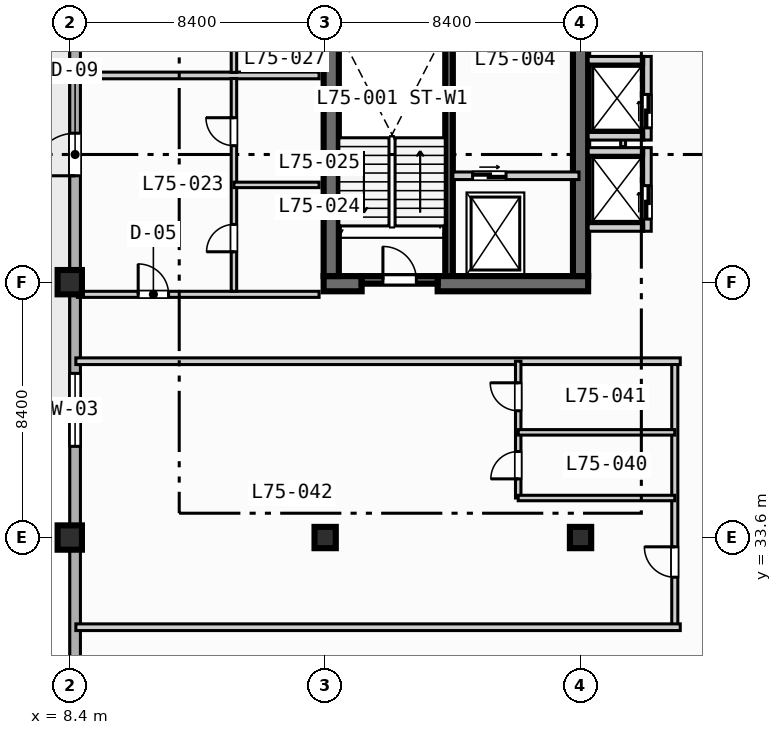
"""IFC4 building model, lengths in metres.
Left out: names, types, materials, properties, quantities, classifications, styles, units other than length and angle.
Written with IfcOpenShell. Run it as: python <this file> out.ifc"""

import sys

from ifc_helpers import new_model, si_unit, direction, frame, frame_2d, origin, origin_2d, place, context, subcontext, project, spatial, rectangle, extrude, element, fill, save


model = new_model("IFC4")
c1 = context("Model", 3, precision=1e-05, world=origin(), true_north=direction((0.0, 1.0)))
c2 = subcontext(c1, "Body", "Model", "MODEL_VIEW")
j1 = project(units=[si_unit("LENGTHUNIT", "METRE"), si_unit("PLANEANGLEUNIT", "RADIAN")], contexts=[c1])
p1 = place(None, origin())
s1 = spatial("IfcSite", under=j1, at=p1, CompositionType="ELEMENT")
p2 = place(p1, origin())
s2 = spatial("IfcBuilding", under=s1, at=p2, CompositionType="ELEMENT")
p3 = place(p2, frame((0.0, 0.0, 304.7)))
s3 = spatial("IfcBuildingStorey", under=s2, at=p3, CompositionType="ELEMENT", Elevation=304.7)
p4 = place(p3, frame((20.875, 42.2, 0.0), z_axis=(0.0, 0.0, 1.0), x_axis=(0.0, 1.0, 0.0)))
e1 = element("IfcWall", 1, at=p4, inside=s3, PredefinedType="SOLIDWALL", context=c2, shape_type="SweptSolid", body=[
    extrude(rectangle(XDim=8.05, YDim=0.25, at=frame_2d((4.025, 0.0))), origin(), (0.0, 0.0, 1.0), 3.67),
])
p5 = place(p3, frame((16.75, 41.95, 0.0), z_axis=(0.0, 0.0, 1.0), x_axis=(1.0, 0.0, 0.0)))
e2 = element("IfcWall", 2, at=p5, inside=s3, PredefinedType="SHEAR", context=c2, shape_type="SweptSolid", body=[
    extrude(rectangle(XDim=1.25, YDim=0.5, at=frame_2d((0.625, 0.0))), origin(), (0.0, 0.0, 1.0), 3.67),
])
p6 = place(p3, frame((20.5, 41.95, 0.0), z_axis=(0.0, 0.0, 1.0), x_axis=(1.0, 0.0, 0.0)))
e3 = element("IfcWall", 3, at=p6, inside=s3, PredefinedType="SHEAR", context=c2, shape_type="SweptSolid", body=[
    extrude(rectangle(XDim=4.95, YDim=0.5, at=frame_2d((2.475, 0.0))), origin(), (0.0, 0.0, 1.0), 3.67),
])
p7 = place(p3, frame((17.0, 42.2, 0.0), z_axis=(0.0, 0.0, 1.0), x_axis=(0.0, 1.0, 0.0)))
e4 = element("IfcWall", 4, at=p7, inside=s3, PredefinedType="SHEAR", context=c2, shape_type="SweptSolid", body=[
    extrude(rectangle(XDim=16.35, YDim=0.5, at=frame_2d((8.175, 0.0))), origin(), (0.0, 0.0, 1.0), 3.67),
])
p8 = place(p3, frame((25.2, 42.2, 0.0), z_axis=(0.0, 0.0, 1.0), x_axis=(0.0, 1.0, 0.0)))
e5 = element("IfcWall", 5, at=p8, inside=s3, PredefinedType="SHEAR", context=c2, shape_type="SweptSolid", body=[
    extrude(rectangle(XDim=8.6, YDim=0.5, at=frame_2d((4.3, 0.0))), origin(), (0.0, 0.0, 1.0), 3.67),
])
for number, where, z_axis, x_axis in (
    (6, (8.4, 33.6, 0.0), (0.0, 0.0, 1.0), (1.0, 0.0, 0.0)),
    (7, (8.4, 42.0, 0.0), (0.0, 0.0, 1.0), (1.0, 0.0, 0.0)),
):
    element("IfcColumn", number, at=place(p3, frame(where, z_axis=z_axis, x_axis=x_axis)), inside=s3, PredefinedType="COLUMN", context=c2, shape_type="SweptSolid", body=[
        extrude(rectangle(XDim=0.8, YDim=0.8, at=origin_2d()), origin(), (0.0, 0.0, 1.0), 3.9),
    ])
for number, where, z_axis, x_axis in (
    (8, (16.8, 33.6, 0.0), (0.0, 0.0, 1.0), (1.0, 0.0, 0.0)),
    (9, (25.2, 33.6, 0.0), (0.0, 0.0, 1.0), (1.0, 0.0, 0.0)),
):
    element("IfcColumn", number, at=place(p3, frame(where, z_axis=z_axis, x_axis=x_axis)), inside=s3, PredefinedType="COLUMN", context=c2, shape_type="SweptSolid", body=[
        extrude(rectangle(XDim=0.7, YDim=0.7, at=origin_2d()), origin(), (0.0, 0.0, 1.0), 3.9),
    ])
p9 = place(p3, frame((8.575, 11.575, 0.0), z_axis=(0.0, 0.0, 1.0), x_axis=(0.0, 1.0, 0.0)))
e10 = element("IfcWall", 10, at=p9, inside=s3, PredefinedType="STANDARD", context=c2, shape_type="SweptSolid", body=[
    extrude(rectangle(XDim=60.85, YDim=0.35, at=frame_2d((30.425, 0.0))), origin(), (0.0, 0.0, 1.0), 3.67),
])
p10 = place(p9, frame((33.925, 0.0, 0.0)))
e11 = element("IfcOpeningElement", 11, at=p10, cuts=e10, PredefinedType="OPENING", context=c2, shape_type="SweptSolid", body=[
    extrude(rectangle(XDim=1.4, YDim=2.2, at=frame_2d((0.7, 1.1))), frame((0.0, 0.185, 0.0), z_axis=(0.0, -1.0, 0.0), x_axis=(1.0, 0.0, 0.0)), (0.0, 0.0, 1.0), 0.37),
])
p11 = place(p9, frame((25.025, 0.0, 0.85)))
e12 = element("IfcOpeningElement", 12, at=p11, cuts=e10, PredefinedType="OPENING", context=c2, shape_type="SweptSolid", body=[
    extrude(rectangle(XDim=2.4, YDim=1.95, at=frame_2d((1.2, 0.975))), frame((0.0, 0.185, 0.0), z_axis=(0.0, -1.0, 0.0), x_axis=(1.0, 0.0, 0.0)), (0.0, 0.0, 1.0), 0.37),
])
p12 = place(p9, frame((41.825, 0.0, 0.85)))
e13 = element("IfcOpeningElement", 13, at=p12, cuts=e10, PredefinedType="OPENING", context=c2, shape_type="SweptSolid", body=[
    extrude(rectangle(XDim=2.4, YDim=1.95, at=frame_2d((1.2, 0.975))), frame((0.0, 0.185, 0.0), z_axis=(0.0, -1.0, 0.0), x_axis=(1.0, 0.0, 0.0)), (0.0, 0.0, 1.0), 0.37),
])
p13 = place(p3, frame((18.0, 42.075, 0.0), z_axis=(0.0, 0.0, 1.0), x_axis=(1.0, 0.0, 0.0)))
e14 = element("IfcWall", 14, at=p13, inside=s3, PredefinedType="SOLIDWALL", context=c2, shape_type="SweptSolid", body=[
    extrude(rectangle(XDim=2.5, YDim=0.25, at=frame_2d((1.25, 0.0))), origin(), (0.0, 0.0, 1.0), 3.67),
])
p14 = place(p13, frame((0.7, 0.0, 0.0)))
e15 = element("IfcOpeningElement", 15, at=p14, cuts=e14, PredefinedType="OPENING", context=c2, shape_type="SweptSolid", body=[
    extrude(rectangle(XDim=1.1, YDim=2.15, at=frame_2d((0.55, 1.075))), frame((0.0, 0.135, 0.0), z_axis=(0.0, -1.0, 0.0), x_axis=(1.0, 0.0, 0.0)), (0.0, 0.0, 1.0), 0.27),
])
p15 = place(p3, frame((21.0, 45.5, 0.0), z_axis=(0.0, 0.0, 1.0), x_axis=(1.0, 0.0, 0.0)))
e16 = element("IfcWall", 16, at=p15, inside=s3, PredefinedType="SOLIDWALL", context=c2, shape_type="SweptSolid", body=[
    extrude(rectangle(XDim=4.15, YDim=0.25, at=frame_2d((2.075, 0.0))), origin(), (0.0, 0.0, 1.0), 3.67),
])
p16 = place(p15, frame((0.65, 0.0, 0.0)))
e17 = element("IfcOpeningElement", 17, at=p16, cuts=e16, PredefinedType="OPENING", context=c2, shape_type="SweptSolid", body=[
    extrude(rectangle(XDim=1.1, YDim=2.15, at=frame_2d((0.55, 1.075))), frame((0.0, 0.135, 0.0), z_axis=(0.0, -1.0, 0.0), x_axis=(1.0, 0.0, 0.0)), (0.0, 0.0, 1.0), 0.27),
])
p17 = place(p3, frame((27.4, 43.675, 0.0), z_axis=(0.0, 0.0, 1.0), x_axis=(0.0, 1.0, 0.0)))
e18 = element("IfcWall", 18, at=p17, inside=s3, PredefinedType="SOLIDWALL", context=c2, shape_type="SweptSolid", body=[
    extrude(rectangle(XDim=2.75, YDim=0.25, at=frame_2d((1.375, 0.0))), origin(), (0.0, 0.0, 1.0), 3.67),
])
p18 = place(p17, frame((0.4, 0.0, 0.0)))
e19 = element("IfcOpeningElement", 19, at=p18, cuts=e18, PredefinedType="OPENING", context=c2, shape_type="SweptSolid", body=[
    extrude(rectangle(XDim=1.1, YDim=2.15, at=frame_2d((0.55, 1.075))), frame((0.0, 0.135, 0.0), z_axis=(0.0, -1.0, 0.0), x_axis=(1.0, 0.0, 0.0)), (0.0, 0.0, 1.0), 0.27),
])
for number, where, z_axis, x_axis in (
    (20, (25.45, 43.8, 0.0), (0.0, 0.0, 1.0), (1.0, 0.0, 0.0)),
    (21, (25.45, 46.3, 0.0), (0.0, 0.0, 1.0), (1.0, 0.0, 0.0)),
):
    element("IfcWall", number, at=place(p3, frame(where, z_axis=z_axis, x_axis=x_axis)), inside=s3, PredefinedType="SOLIDWALL", context=c2, shape_type="SweptSolid", body=[
        extrude(rectangle(XDim=1.825, YDim=0.25, at=frame_2d((0.913, 0.0))), origin(), (0.0, 0.0, 1.0), 3.67),
    ])
p19 = place(p3, frame((26.6, 46.46, 0.0), z_axis=(0.0, 0.0, 1.0), x_axis=(0.0, 1.0, 0.0)))
e22 = element("IfcWall", 22, at=p19, inside=s3, PredefinedType="PARTITIONING", context=c2, shape_type="SweptSolid", body=[
    extrude(rectangle(XDim=0.88, YDim=0.16, at=frame_2d((0.44, 0.0))), origin(), (0.0, 0.0, 1.0), 3.67),
])
p20 = place(p3, frame((27.4, 46.675, 0.0), z_axis=(0.0, 0.0, 1.0), x_axis=(0.0, 1.0, 0.0)))
e23 = element("IfcWall", 23, at=p20, inside=s3, PredefinedType="SOLIDWALL", context=c2, shape_type="SweptSolid", body=[
    extrude(rectangle(XDim=2.75, YDim=0.25, at=frame_2d((1.375, 0.0))), origin(), (0.0, 0.0, 1.0), 3.67),
])
p21 = place(p20, frame((0.4, 0.0, 0.0)))
e24 = element("IfcOpeningElement", 24, at=p21, cuts=e23, PredefinedType="OPENING", context=c2, shape_type="SweptSolid", body=[
    extrude(rectangle(XDim=1.1, YDim=2.15, at=frame_2d((0.55, 1.075))), frame((0.0, 0.135, 0.0), z_axis=(0.0, -1.0, 0.0), x_axis=(1.0, 0.0, 0.0)), (0.0, 0.0, 1.0), 0.27),
])
for number, where, z_axis, x_axis in (
    (25, (25.45, 46.8, 0.0), (0.0, 0.0, 1.0), (1.0, 0.0, 0.0)),
    (26, (25.45, 49.3, 0.0), (0.0, 0.0, 1.0), (1.0, 0.0, 0.0)),
):
    element("IfcWall", number, at=place(p3, frame(where, z_axis=z_axis, x_axis=x_axis)), inside=s3, PredefinedType="SOLIDWALL", context=c2, shape_type="SweptSolid", body=[
        extrude(rectangle(XDim=1.825, YDim=0.25, at=frame_2d((0.913, 0.0))), origin(), (0.0, 0.0, 1.0), 3.67),
    ])
p22 = place(p3, frame((8.65, 41.6, 0.0), z_axis=(0.0, 0.0, 1.0), x_axis=(1.0, 0.0, 0.0)))
e27 = element("IfcWall", 27, at=p22, inside=s3, PredefinedType="PARTITIONING", context=c2, shape_type="SweptSolid", body=[
    extrude(rectangle(XDim=7.95, YDim=0.2, at=frame_2d((3.975, 0.0))), origin(), (0.0, 0.0, 1.0), 3.67),
])
p23 = place(p22, frame((2.0, 0.0, 0.0)))
e28 = element("IfcOpeningElement", 28, at=p23, cuts=e27, PredefinedType="OPENING", context=c2, shape_type="SweptSolid", body=[
    extrude(rectangle(XDim=1.0, YDim=2.15, at=frame_2d((0.5, 1.075))), frame((0.0, 0.11, 0.0), z_axis=(0.0, -1.0, 0.0), x_axis=(1.0, 0.0, 0.0)), (0.0, 0.0, 1.0), 0.22),
])
p24 = place(p3, frame((8.65, 48.8, 0.0), z_axis=(0.0, 0.0, 1.0), x_axis=(1.0, 0.0, 0.0)))
e29 = element("IfcWall", 29, at=p24, inside=s3, PredefinedType="PARTITIONING", context=c2, shape_type="SweptSolid", body=[
    extrude(rectangle(XDim=7.95, YDim=0.22, at=frame_2d((3.975, 0.0))), origin(), (0.0, 0.0, 1.0), 3.67),
])
p25 = place(p3, frame((13.8, 41.7, 0.0), z_axis=(0.0, 0.0, 1.0), x_axis=(0.0, 1.0, 0.0)))
e30 = element("IfcWall", 30, at=p25, inside=s3, PredefinedType="PLUMBINGWALL", context=c2, shape_type="SweptSolid", body=[
    extrude(rectangle(XDim=7.0, YDim=0.18, at=frame_2d((3.5, 0.0))), origin(), (0.0, 0.0, 1.0), 3.67),
])
p26 = place(p25, frame((1.3, 0.0, 0.0)))
e31 = element("IfcOpeningElement", 31, at=p26, cuts=e30, PredefinedType="OPENING", context=c2, shape_type="SweptSolid", body=[
    extrude(rectangle(XDim=0.9, YDim=2.1, at=frame_2d((0.45, 1.05))), frame((0.0, 0.1, 0.0), z_axis=(0.0, -1.0, 0.0), x_axis=(1.0, 0.0, 0.0)), (0.0, 0.0, 1.0), 0.2),
])
p27 = place(p25, frame((4.79, 0.0, 0.0)))
e32 = element("IfcOpeningElement", 32, at=p27, cuts=e30, PredefinedType="OPENING", context=c2, shape_type="SweptSolid", body=[
    extrude(rectangle(XDim=0.92, YDim=2.1, at=frame_2d((0.46, 1.05))), frame((0.0, 0.1, 0.0), z_axis=(0.0, -1.0, 0.0), x_axis=(1.0, 0.0, 0.0)), (0.0, 0.0, 1.0), 0.2),
])
p28 = place(p3, frame((13.8, 45.2, 0.0), z_axis=(0.0, 0.0, 1.0), x_axis=(1.0, 0.0, 0.0)))
e33 = element("IfcWall", 33, at=p28, inside=s3, PredefinedType="PLUMBINGWALL", context=c2, shape_type="SweptSolid", body=[
    extrude(rectangle(XDim=2.8, YDim=0.18, at=frame_2d((1.4, 0.0))), origin(), (0.0, 0.0, 1.0), 3.67),
])
p29 = place(p3, frame((13.8, 48.9, 0.0), z_axis=(0.0, 0.0, 1.0), x_axis=(0.0, 1.0, 0.0)))
e34 = element("IfcWall", 34, at=p29, inside=s3, PredefinedType="PLUMBINGWALL", context=c2, shape_type="SweptSolid", body=[
    extrude(rectangle(XDim=10.0, YDim=0.18, at=frame_2d((5.0, 0.0))), origin(), (0.0, 0.0, 1.0), 3.67),
])
p30 = place(p29, frame((2.05, 0.0, 0.0)))
e35 = element("IfcOpeningElement", 35, at=p30, cuts=e34, PredefinedType="OPENING", context=c2, shape_type="SweptSolid", body=[
    extrude(rectangle(XDim=0.9, YDim=2.1, at=frame_2d((0.45, 1.05))), frame((0.0, 0.1, 0.0), z_axis=(0.0, -1.0, 0.0), x_axis=(1.0, 0.0, 0.0)), (0.0, 0.0, 1.0), 0.2),
])
p31 = place(p29, frame((7.04, 0.0, 0.0)))
e36 = element("IfcOpeningElement", 36, at=p31, cuts=e34, PredefinedType="OPENING", context=c2, shape_type="SweptSolid", body=[
    extrude(rectangle(XDim=0.92, YDim=2.1, at=frame_2d((0.46, 1.05))), frame((0.0, 0.1, 0.0), z_axis=(0.0, -1.0, 0.0), x_axis=(1.0, 0.0, 0.0)), (0.0, 0.0, 1.0), 0.2),
])
p32 = place(p3, frame((28.3, 30.65, 0.0), z_axis=(0.0, 0.0, 1.0), x_axis=(0.0, 1.0, 0.0)))
e37 = element("IfcWall", 37, at=p32, inside=s3, PredefinedType="PARTITIONING", context=c2, shape_type="SweptSolid", body=[
    extrude(rectangle(XDim=8.75, YDim=0.2, at=frame_2d((4.375, 0.0))), origin(), (0.0, 0.0, 1.0), 3.67),
])
p33 = place(p32, frame((1.645, 0.0, 0.0)))
e38 = element("IfcOpeningElement", 38, at=p33, cuts=e37, PredefinedType="OPENING", context=c2, shape_type="SweptSolid", body=[
    extrude(rectangle(XDim=1.0, YDim=2.15, at=frame_2d((0.5, 1.075))), frame((0.0, 0.11, 0.0), z_axis=(0.0, -1.0, 0.0), x_axis=(1.0, 0.0, 0.0)), (0.0, 0.0, 1.0), 0.22),
])
for number, where, z_axis, x_axis in (
    (39, (8.6, 30.65, 0.0), (0.0, 0.0, 1.0), (1.0, 0.0, 0.0)),
    (40, (8.6, 39.4, 0.0), (0.0, 0.0, 1.0), (1.0, 0.0, 0.0)),
):
    element("IfcWall", number, at=place(p3, frame(where, z_axis=z_axis, x_axis=x_axis)), inside=s3, PredefinedType="PARTITIONING", context=c2, shape_type="SweptSolid", body=[
        extrude(rectangle(XDim=19.88, YDim=0.22, at=frame_2d((9.94, 0.0))), origin(), (0.0, 0.0, 1.0), 3.67),
    ])
p34 = place(p3, frame((23.15, 34.9, 0.0), z_axis=(0.0, 0.0, 1.0), x_axis=(0.0, 1.0, 0.0)))
e41 = element("IfcWall", 41, at=p34, inside=s3, PredefinedType="PLUMBINGWALL", context=c2, shape_type="SweptSolid", body=[
    extrude(rectangle(XDim=4.5, YDim=0.18, at=frame_2d((2.25, 0.0))), origin(), (0.0, 0.0, 1.0), 3.67),
])
p35 = place(p34, frame((0.63, 0.0, 0.0)))
e42 = element("IfcOpeningElement", 42, at=p35, cuts=e41, PredefinedType="OPENING", context=c2, shape_type="SweptSolid", body=[
    extrude(rectangle(XDim=0.9, YDim=2.1, at=frame_2d((0.45, 1.05))), frame((0.0, 0.1, 0.0), z_axis=(0.0, -1.0, 0.0), x_axis=(1.0, 0.0, 0.0)), (0.0, 0.0, 1.0), 0.2),
])
p36 = place(p34, frame((2.87, 0.0, 0.0)))
e43 = element("IfcOpeningElement", 43, at=p36, cuts=e41, PredefinedType="OPENING", context=c2, shape_type="SweptSolid", body=[
    extrude(rectangle(XDim=0.92, YDim=2.1, at=frame_2d((0.46, 1.05))), frame((0.0, 0.1, 0.0), z_axis=(0.0, -1.0, 0.0), x_axis=(1.0, 0.0, 0.0)), (0.0, 0.0, 1.0), 0.2),
])
for number, where, z_axis, x_axis in (
    (44, (23.15, 34.9, 0.0), (0.0, 0.0, 1.0), (1.0, 0.0, 0.0)),
    (45, (23.15, 37.06, 0.0), (0.0, 0.0, 1.0), (1.0, 0.0, 0.0)),
):
    element("IfcWall", number, at=place(p3, frame(where, z_axis=z_axis, x_axis=x_axis)), inside=s3, PredefinedType="PLUMBINGWALL", context=c2, shape_type="SweptSolid", body=[
        extrude(rectangle(XDim=5.15, YDim=0.18, at=frame_2d((2.575, 0.0))), origin(), (0.0, 0.0, 1.0), 3.67),
    ])
p37 = place(p10, origin())
e46 = element("IfcDoor", 46, at=p37, inside=s3, OperationType="SINGLE_SWING_LEFT", PredefinedType="DOOR", context=c2, shape_type="SweptSolid", body=[
    extrude(rectangle(XDim=1.4, YDim=2.2, at=frame_2d((0.7, 1.1))), frame((0.0, 0.025, 0.0), z_axis=(0.0, -1.0, 0.0), x_axis=(1.0, 0.0, 0.0)), (0.0, 0.0, 1.0), 0.05),
])
fill(e11, e46)
p38 = place(p11, origin())
e47 = element("IfcWindow", 47, at=p38, inside=s3, PartitioningType="SINGLE_PANEL", PredefinedType="WINDOW", context=c2, shape_type="SweptSolid", body=[
    extrude(rectangle(XDim=2.4, YDim=1.95, at=frame_2d((1.2, 0.975))), frame((0.0, 0.03, 0.0), z_axis=(0.0, -1.0, 0.0), x_axis=(1.0, 0.0, 0.0)), (0.0, 0.0, 1.0), 0.06),
])
fill(e12, e47)
p39 = place(p14, origin())
e48 = element("IfcDoor", 48, at=p39, inside=s3, OperationType="SINGLE_SWING_LEFT", PredefinedType="DOOR", context=c2, shape_type="SweptSolid", body=[
    extrude(rectangle(XDim=1.1, YDim=2.15, at=frame_2d((0.55, 1.075))), frame((0.0, 0.025, 0.0), z_axis=(0.0, -1.0, 0.0), x_axis=(1.0, 0.0, 0.0)), (0.0, 0.0, 1.0), 0.05),
])
fill(e15, e48)
p40 = place(p16, origin())
e49 = element("IfcDoor", 49, at=p40, inside=s3, OperationType="SLIDING_TO_LEFT", PredefinedType="DOOR", context=c2, shape_type="SweptSolid", body=[
    extrude(rectangle(XDim=1.1, YDim=2.15, at=frame_2d((0.55, 1.075))), frame((0.0, 0.025, 0.0), z_axis=(0.0, -1.0, 0.0), x_axis=(1.0, 0.0, 0.0)), (0.0, 0.0, 1.0), 0.05),
])
fill(e17, e49)
p41 = place(p18, origin())
e50 = element("IfcDoor", 50, at=p41, inside=s3, OperationType="SLIDING_TO_LEFT", PredefinedType="DOOR", context=c2, shape_type="SweptSolid", body=[
    extrude(rectangle(XDim=1.1, YDim=2.15, at=frame_2d((0.55, 1.075))), frame((0.0, 0.025, 0.0), z_axis=(0.0, -1.0, 0.0), x_axis=(1.0, 0.0, 0.0)), (0.0, 0.0, 1.0), 0.05),
])
fill(e19, e50)
p42 = place(p21, origin())
e51 = element("IfcDoor", 51, at=p42, inside=s3, OperationType="SLIDING_TO_LEFT", PredefinedType="DOOR", context=c2, shape_type="SweptSolid", body=[
    extrude(rectangle(XDim=1.1, YDim=2.15, at=frame_2d((0.55, 1.075))), frame((0.0, 0.025, 0.0), z_axis=(0.0, -1.0, 0.0), x_axis=(1.0, 0.0, 0.0)), (0.0, 0.0, 1.0), 0.05),
])
fill(e24, e51)
p43 = place(p23, origin())
e52 = element("IfcDoor", 52, at=p43, inside=s3, OperationType="SINGLE_SWING_LEFT", PredefinedType="DOOR", context=c2, shape_type="SweptSolid", body=[
    extrude(rectangle(XDim=1.0, YDim=2.15, at=frame_2d((0.5, 1.075))), frame((0.0, 0.025, 0.0), z_axis=(0.0, -1.0, 0.0), x_axis=(1.0, 0.0, 0.0)), (0.0, 0.0, 1.0), 0.05),
])
fill(e28, e52)
p44 = place(p26, origin())
e53 = element("IfcDoor", 53, at=p44, inside=s3, OperationType="SINGLE_SWING_LEFT", PredefinedType="DOOR", context=c2, shape_type="SweptSolid", body=[
    extrude(rectangle(XDim=0.9, YDim=2.1, at=frame_2d((0.45, 1.05))), frame((0.0, 0.025, 0.0), z_axis=(0.0, -1.0, 0.0), x_axis=(1.0, 0.0, 0.0)), (0.0, 0.0, 1.0), 0.05),
])
fill(e31, e53)
p45 = place(p27, origin())
e54 = element("IfcDoor", 54, at=p45, inside=s3, OperationType="SINGLE_SWING_RIGHT", PredefinedType="DOOR", context=c2, shape_type="SweptSolid", body=[
    extrude(rectangle(XDim=0.92, YDim=2.1, at=frame_2d((0.46, 1.05))), frame((0.0, 0.025, 0.0), z_axis=(0.0, -1.0, 0.0), x_axis=(1.0, 0.0, 0.0)), (0.0, 0.0, 1.0), 0.05),
])
fill(e32, e54)
p46 = place(p33, origin())
e55 = element("IfcDoor", 55, at=p46, inside=s3, OperationType="SINGLE_SWING_RIGHT", PredefinedType="DOOR", context=c2, shape_type="SweptSolid", body=[
    extrude(rectangle(XDim=1.0, YDim=2.15, at=frame_2d((0.5, 1.075))), frame((0.0, 0.025, 0.0), z_axis=(0.0, -1.0, 0.0), x_axis=(1.0, 0.0, 0.0)), (0.0, 0.0, 1.0), 0.05),
])
fill(e38, e55)
p47 = place(p35, origin())
e56 = element("IfcDoor", 56, at=p47, inside=s3, OperationType="SINGLE_SWING_LEFT", PredefinedType="DOOR", context=c2, shape_type="SweptSolid", body=[
    extrude(rectangle(XDim=0.9, YDim=2.1, at=frame_2d((0.45, 1.05))), frame((0.0, 0.025, 0.0), z_axis=(0.0, -1.0, 0.0), x_axis=(1.0, 0.0, 0.0)), (0.0, 0.0, 1.0), 0.05),
])
fill(e42, e56)
p48 = place(p36, origin())
e57 = element("IfcDoor", 57, at=p48, inside=s3, OperationType="SINGLE_SWING_RIGHT", PredefinedType="DOOR", context=c2, shape_type="SweptSolid", body=[
    extrude(rectangle(XDim=0.92, YDim=2.1, at=frame_2d((0.46, 1.05))), frame((0.0, 0.025, 0.0), z_axis=(0.0, -1.0, 0.0), x_axis=(1.0, 0.0, 0.0)), (0.0, 0.0, 1.0), 0.05),
])
fill(e43, e57)
save(model, sys.argv[1])
